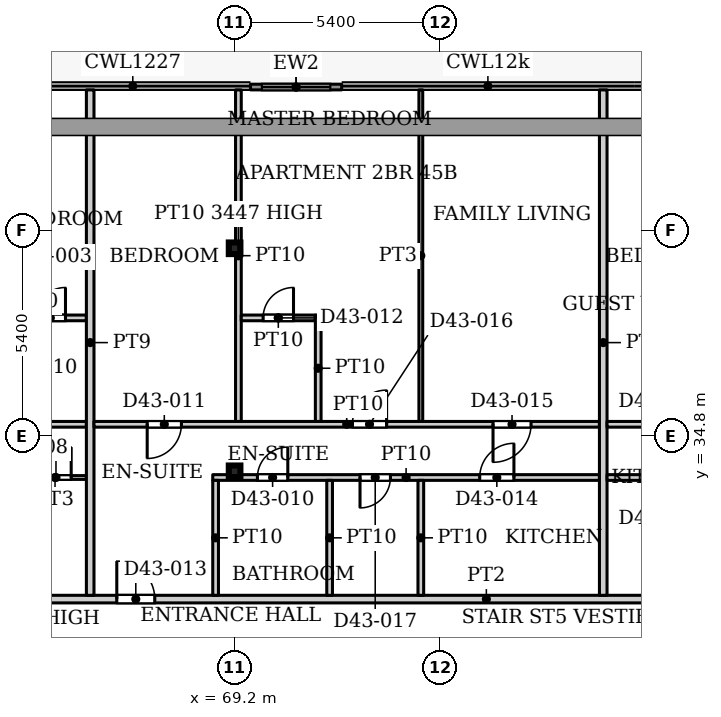
"""IFC4 building model, lengths in metres.
Left out: names, types, materials, properties, quantities, classifications, styles, units other than length and angle.
Written with IfcOpenShell. Run it as: python <this file> out.ifc"""

import sys

from ifc_helpers import new_model, si_unit, direction, frame, frame_2d, origin, origin_2d, place, context, subcontext, project, spatial, rectangle, hollow_rectangle, extrude, source, transform, mapped, element, fill, save


model = new_model("IFC4")
c1 = context("Model", 3, precision=1e-05, world=origin(), true_north=direction((0.0, 1.0)))
c2 = subcontext(c1, "Body", "Model", "MODEL_VIEW")
j1 = project(units=[si_unit("LENGTHUNIT", "METRE"), si_unit("PLANEANGLEUNIT", "RADIAN")], contexts=[c1])
p1 = place(None, origin())
s1 = spatial("IfcSite", under=j1, at=p1, CompositionType="ELEMENT")
p2 = place(p1, origin())
s2 = spatial("IfcBuilding", under=s1, at=p2, CompositionType="ELEMENT")
p3 = place(p2, frame((0.0, 0.0, 191.6)))
s3 = spatial("IfcBuildingStorey", under=s2, at=p3, CompositionType="ELEMENT", Elevation=191.6)
for number, where, z_axis, x_axis in (
    (1, (69.2, 33.863, 0.0), (0.0, 0.0, 1.0), (1.0, 0.0, 0.0)),
    (2, (69.2, 39.732, 0.0), (0.0, 0.0, 1.0), (1.0, 0.0, 0.0)),
):
    element("IfcColumn", number, at=place(p3, frame(where, z_axis=z_axis, x_axis=x_axis)), inside=s3, PredefinedType="COLUMN", context=c2, shape_type="SweptSolid", body=[
        extrude(hollow_rectangle(XDim=0.305, YDim=0.305, WallThickness=0.016, InnerFilletRadius=0.016, OuterFilletRadius=0.032, at=origin_2d()), origin(), (0.0, 0.0, 1.0), 3.9),
    ])
p4 = place(p3, frame((69.618, 43.975, 0.0), z_axis=(0.0, 0.0, 1.0), x_axis=(1.0, 0.0, 0.0)))
e3 = element("IfcWall", 3, at=p4, inside=s3, PredefinedType="SOLIDWALL", context=c2, shape_type="SweptSolid", body=[
    extrude(rectangle(XDim=2.4, YDim=0.15, at=frame_2d((1.2, 0.0))), origin(), (0.0, 0.0, 1.0), 3.75),
])
p5 = place(p4, frame((0.3, 0.0, 0.0)))
e4 = element("IfcOpeningElement", 4, at=p5, cuts=e3, PredefinedType="OPENING", context=c2, shape_type="SweptSolid", body=[
    extrude(rectangle(XDim=1.8, YDim=2.4, at=frame_2d((0.9, 1.2))), frame((0.0, 0.085, 0.0), z_axis=(0.0, -1.0, 0.0), x_axis=(1.0, 0.0, 0.0)), (0.0, 0.0, 1.0), 0.17),
])
p6 = place(p3, frame((53.549, 30.5, 0.0), z_axis=(0.0, 0.0, 1.0), x_axis=(1.0, 0.0, 0.0)))
e5 = element("IfcWall", 5, at=p6, inside=s3, PredefinedType="PARTITIONING", context=c2, shape_type="SweptSolid", body=[
    extrude(rectangle(XDim=44.551, YDim=0.2, at=frame_2d((22.275, 0.0))), origin(), (0.0, 0.0, 1.0), 3.6),
])
p7 = place(p6, frame((8.351, 0.0, 0.0)))
e6 = element("IfcOpeningElement", 6, at=p7, cuts=e5, PredefinedType="OPENING", context=c2, shape_type="SweptSolid", body=[
    extrude(rectangle(XDim=1.0, YDim=2.1, at=frame_2d((0.5, 1.05))), frame((0.0, 0.11, 0.0), z_axis=(0.0, -1.0, 0.0), x_axis=(1.0, 0.0, 0.0)), (0.0, 0.0, 1.0), 0.22),
])
p8 = place(p6, frame((12.551, 0.0, 0.0)))
e7 = element("IfcOpeningElement", 7, at=p8, cuts=e5, PredefinedType="OPENING", context=c2, shape_type="SweptSolid", body=[
    extrude(rectangle(XDim=1.0, YDim=2.1, at=frame_2d((0.5, 1.05))), frame((0.0, 0.11, 0.0), z_axis=(0.0, -1.0, 0.0), x_axis=(1.0, 0.0, 0.0)), (0.0, 0.0, 1.0), 0.22),
])
p9 = place(p6, frame((28.751, 0.0, 0.0)))
e8 = element("IfcOpeningElement", 8, at=p9, cuts=e5, PredefinedType="OPENING", context=c2, shape_type="SweptSolid", body=[
    extrude(rectangle(XDim=1.0, YDim=2.1, at=frame_2d((0.5, 1.05))), frame((0.0, 0.11, 0.0), z_axis=(0.0, -1.0, 0.0), x_axis=(1.0, 0.0, 0.0)), (0.0, 0.0, 1.0), 0.22),
])
p10 = place(p6, frame((40.751, 0.0, 0.0)))
e9 = element("IfcOpeningElement", 9, at=p10, cuts=e5, PredefinedType="OPENING", context=c2, shape_type="SweptSolid", body=[
    extrude(rectangle(XDim=1.0, YDim=2.1, at=frame_2d((0.5, 1.05))), frame((0.0, 0.11, 0.0), z_axis=(0.0, -1.0, 0.0), x_axis=(1.0, 0.0, 0.0)), (0.0, 0.0, 1.0), 0.22),
])
p11 = place(p3, frame((53.549, 35.1, 0.0), z_axis=(0.0, 0.0, 1.0), x_axis=(1.0, 0.0, 0.0)))
e10 = element("IfcWall", 10, at=p11, inside=s3, PredefinedType="PARTITIONING", context=c2, shape_type="SweptSolid", body=[
    extrude(rectangle(XDim=11.751, YDim=0.15, at=frame_2d((5.875, 0.0))), origin(), (0.0, 0.0, 1.0), 3.6),
])
p12 = place(p11, frame((5.551, 0.0, 0.0)))
e11 = element("IfcOpeningElement", 11, at=p12, cuts=e10, PredefinedType="OPENING", context=c2, shape_type="SweptSolid", body=[
    extrude(rectangle(XDim=0.9, YDim=2.1, at=frame_2d((0.45, 1.05))), frame((0.0, 0.085, 0.0), z_axis=(0.0, -1.0, 0.0), x_axis=(1.0, 0.0, 0.0)), (0.0, 0.0, 1.0), 0.17),
])
p13 = place(p11, frame((1.751, 0.0, 0.0)))
e12 = element("IfcOpeningElement", 12, at=p13, cuts=e10, PredefinedType="OPENING", context=c2, shape_type="SweptSolid", body=[
    extrude(rectangle(XDim=1.0, YDim=2.1, at=frame_2d((0.5, 1.05))), frame((0.0, 0.085, 0.0), z_axis=(0.0, -1.0, 0.0), x_axis=(1.0, 0.0, 0.0)), (0.0, 0.0, 1.0), 0.17),
])
p14 = place(p11, frame((8.101, 0.0, 0.0)))
e13 = element("IfcOpeningElement", 13, at=p14, cuts=e10, PredefinedType="OPENING", context=c2, shape_type="SweptSolid", body=[
    extrude(rectangle(XDim=0.9, YDim=2.1, at=frame_2d((0.45, 1.05))), frame((0.0, 0.085, 0.0), z_axis=(0.0, -1.0, 0.0), x_axis=(1.0, 0.0, 0.0)), (0.0, 0.0, 1.0), 0.17),
])
p15 = place(p3, frame((63.375, 37.9, 0.0), z_axis=(0.0, 0.0, 1.0), x_axis=(1.0, 0.0, 0.0)))
e14 = element("IfcWall", 14, at=p15, inside=s3, PredefinedType="PARTITIONING", context=c2, shape_type="SweptSolid", body=[
    extrude(rectangle(XDim=1.925, YDim=0.15, at=frame_2d((0.962, 0.0))), origin(), (0.0, 0.0, 1.0), 3.6),
])
p16 = place(p15, frame((0.575, 0.0, 0.0)))
e15 = element("IfcOpeningElement", 15, at=p16, cuts=e14, PredefinedType="OPENING", context=c2, shape_type="SweptSolid", body=[
    extrude(rectangle(XDim=0.8, YDim=2.1, at=frame_2d((0.4, 1.05))), frame((0.0, 0.085, 0.0), z_axis=(0.0, -1.0, 0.0), x_axis=(1.0, 0.0, 0.0)), (0.0, 0.0, 1.0), 0.17),
])
p17 = place(p3, frame((63.65, 33.7, 0.0), z_axis=(0.0, 0.0, 1.0), x_axis=(1.0, 0.0, 0.0)))
e16 = element("IfcWall", 16, at=p17, inside=s3, PredefinedType="PARTITIONING", context=c2, shape_type="SweptSolid", body=[
    extrude(rectangle(XDim=1.65, YDim=0.1, at=frame_2d((0.825, 0.0))), origin(), (0.0, 0.0, 1.0), 3.6),
])
p18 = place(p17, frame((0.45, 0.0, 0.0)))
e17 = element("IfcOpeningElement", 17, at=p18, cuts=e16, PredefinedType="OPENING", context=c2, shape_type="SweptSolid", body=[
    extrude(rectangle(XDim=0.8, YDim=2.1, at=frame_2d((0.4, 1.05))), frame((0.0, 0.06, 0.0), z_axis=(0.0, -1.0, 0.0), x_axis=(1.0, 0.0, 0.0)), (0.0, 0.0, 1.0), 0.12),
])
p19 = place(p3, frame((65.4, 30.6, 0.0), z_axis=(0.0, 0.0, 1.0), x_axis=(0.0, 1.0, 0.0)))
e18 = element("IfcWall", 18, at=p19, inside=s3, PredefinedType="PARTITIONING", context=c2, shape_type="SweptSolid", body=[
    extrude(rectangle(XDim=13.3, YDim=0.2, at=frame_2d((6.65, 0.0))), origin(), (0.0, 0.0, 1.0), 3.6),
])
p20 = place(p3, frame((65.5, 35.1, 0.0), z_axis=(0.0, 0.0, 1.0), x_axis=(1.0, 0.0, 0.0)))
e19 = element("IfcWall", 19, at=p20, inside=s3, PredefinedType="PARTITIONING", context=c2, shape_type="SweptSolid", body=[
    extrude(rectangle(XDim=13.3, YDim=0.15, at=frame_2d((6.65, 0.0))), origin(), (0.0, 0.0, 1.0), 3.6),
])
p21 = place(p20, frame((1.4, 0.0, 0.0)))
e20 = element("IfcOpeningElement", 20, at=p21, cuts=e19, PredefinedType="OPENING", context=c2, shape_type="SweptSolid", body=[
    extrude(rectangle(XDim=0.9, YDim=2.1, at=frame_2d((0.45, 1.05))), frame((0.0, 0.085, 0.0), z_axis=(0.0, -1.0, 0.0), x_axis=(1.0, 0.0, 0.0)), (0.0, 0.0, 1.0), 0.17),
])
p22 = place(p20, frame((10.5, 0.0, 0.0)))
e21 = element("IfcOpeningElement", 21, at=p22, cuts=e19, PredefinedType="OPENING", context=c2, shape_type="SweptSolid", body=[
    extrude(rectangle(XDim=1.0, YDim=2.1, at=frame_2d((0.5, 1.05))), frame((0.0, 0.085, 0.0), z_axis=(0.0, -1.0, 0.0), x_axis=(1.0, 0.0, 0.0)), (0.0, 0.0, 1.0), 0.17),
])
p23 = place(p20, frame((6.8, 0.0, 0.0)))
e22 = element("IfcOpeningElement", 22, at=p23, cuts=e19, PredefinedType="OPENING", context=c2, shape_type="SweptSolid", body=[
    extrude(rectangle(XDim=0.9, YDim=2.1, at=frame_2d((0.45, 1.05))), frame((0.0, 0.085, 0.0), z_axis=(0.0, -1.0, 0.0), x_axis=(1.0, 0.0, 0.0)), (0.0, 0.0, 1.0), 0.17),
])
p24 = place(p3, frame((68.625, 33.7, 0.0), z_axis=(0.0, 0.0, 1.0), x_axis=(1.0, 0.0, 0.0)))
e23 = element("IfcWall", 23, at=p24, inside=s3, PredefinedType="PARTITIONING", context=c2, shape_type="SweptSolid", body=[
    extrude(rectangle(XDim=10.175, YDim=0.15, at=frame_2d((5.087, 0.0))), origin(), (0.0, 0.0, 1.0), 3.6),
])
p25 = place(p24, frame((1.175, 0.0, 0.0)))
e24 = element("IfcOpeningElement", 24, at=p25, cuts=e23, PredefinedType="OPENING", context=c2, shape_type="SweptSolid", body=[
    extrude(rectangle(XDim=0.8, YDim=2.1, at=frame_2d((0.4, 1.05))), frame((0.0, 0.085, 0.0), z_axis=(0.0, -1.0, 0.0), x_axis=(1.0, 0.0, 0.0)), (0.0, 0.0, 1.0), 0.17),
])
p26 = place(p24, frame((7.025, 0.0, 0.0)))
e25 = element("IfcOpeningElement", 25, at=p26, cuts=e23, PredefinedType="OPENING", context=c2, shape_type="SweptSolid", body=[
    extrude(rectangle(XDim=0.9, YDim=2.1, at=frame_2d((0.45, 1.05))), frame((0.0, 0.085, 0.0), z_axis=(0.0, -1.0, 0.0), x_axis=(1.0, 0.0, 0.0)), (0.0, 0.0, 1.0), 0.17),
])
p27 = place(p24, frame((3.875, 0.0, 0.0)))
e26 = element("IfcOpeningElement", 26, at=p27, cuts=e23, PredefinedType="OPENING", context=c2, shape_type="SweptSolid", body=[
    extrude(rectangle(XDim=0.8, YDim=2.1, at=frame_2d((0.4, 1.05))), frame((0.0, 0.085, 0.0), z_axis=(0.0, -1.0, 0.0), x_axis=(1.0, 0.0, 0.0)), (0.0, 0.0, 1.0), 0.17),
])
p28 = place(p3, frame((68.7, 30.6, 0.0), z_axis=(0.0, 0.0, 1.0), x_axis=(0.0, 1.0, 0.0)))
e27 = element("IfcWall", 27, at=p28, inside=s3, PredefinedType="PARTITIONING", context=c2, shape_type="SweptSolid", body=[
    extrude(rectangle(XDim=3.025, YDim=0.15, at=frame_2d((1.512, 0.0))), origin(), (0.0, 0.0, 1.0), 3.6),
])
p29 = place(p3, frame((69.3, 35.175, 0.0), z_axis=(0.0, 0.0, 1.0), x_axis=(0.0, 1.0, 0.0)))
e28 = element("IfcWall", 28, at=p29, inside=s3, PredefinedType="PARTITIONING", context=c2, shape_type="SweptSolid", body=[
    extrude(rectangle(XDim=8.725, YDim=0.15, at=frame_2d((4.362, 0.0))), origin(), (0.0, 0.0, 1.0), 3.447),
])
p30 = place(p3, frame((69.375, 37.9, 0.0), z_axis=(0.0, 0.0, 1.0), x_axis=(1.0, 0.0, 0.0)))
e29 = element("IfcWall", 29, at=p30, inside=s3, PredefinedType="PARTITIONING", context=c2, shape_type="SweptSolid", body=[
    extrude(rectangle(XDim=1.95, YDim=0.15, at=frame_2d((0.975, 0.0))), origin(), (0.0, 0.0, 1.0), 3.6),
])
p31 = place(p30, frame((0.575, 0.0, 0.0)))
e30 = element("IfcOpeningElement", 30, at=p31, cuts=e29, PredefinedType="OPENING", context=c2, shape_type="SweptSolid", body=[
    extrude(rectangle(XDim=0.8, YDim=2.1, at=frame_2d((0.4, 1.05))), frame((0.0, 0.085, 0.0), z_axis=(0.0, -1.0, 0.0), x_axis=(1.0, 0.0, 0.0)), (0.0, 0.0, 1.0), 0.17),
])
p32 = place(p3, frame((71.4, 35.175, 0.0), z_axis=(0.0, 0.0, 1.0), x_axis=(0.0, 1.0, 0.0)))
e31 = element("IfcWall", 31, at=p32, inside=s3, PredefinedType="PARTITIONING", context=c2, shape_type="SweptSolid", body=[
    extrude(rectangle(XDim=2.8, YDim=0.15, at=frame_2d((1.4, 0.0))), origin(), (0.0, 0.0, 1.0), 3.6),
])
for number, where, z_axis, x_axis in (
    (32, (71.7, 30.6, 0.0), (0.0, 0.0, 1.0), (0.0, 1.0, 0.0)),
    (33, (74.1, 30.6, 0.0), (0.0, 0.0, 1.0), (0.0, 1.0, 0.0)),
):
    element("IfcWall", number, at=place(p3, frame(where, z_axis=z_axis, x_axis=x_axis)), inside=s3, PredefinedType="PARTITIONING", context=c2, shape_type="SweptSolid", body=[
        extrude(rectangle(XDim=3.025, YDim=0.15, at=frame_2d((1.512, 0.0))), origin(), (0.0, 0.0, 1.0), 3.6),
    ])
p33 = place(p3, frame((74.1, 35.175, 0.0), z_axis=(0.0, 0.0, 1.0), x_axis=(0.0, 1.0, 0.0)))
e34 = element("IfcWall", 34, at=p33, inside=s3, PredefinedType="PARTITIONING", context=c2, shape_type="SweptSolid", body=[
    extrude(rectangle(XDim=8.725, YDim=0.1, at=frame_2d((4.362, 0.0))), origin(), (0.0, 0.0, 1.0), 3.6),
])
p34 = place(p3, frame((78.9, 30.6, 0.0), z_axis=(0.0, 0.0, 1.0), x_axis=(0.0, 1.0, 0.0)))
e35 = element("IfcWall", 35, at=p34, inside=s3, PredefinedType="PARTITIONING", context=c2, shape_type="SweptSolid", body=[
    extrude(rectangle(XDim=13.3, YDim=0.2, at=frame_2d((6.65, 0.0))), origin(), (0.0, 0.0, 1.0), 3.6),
])
p35 = place(p3, frame((79.0, 33.7, 0.0), z_axis=(0.0, 0.0, 1.0), x_axis=(1.0, 0.0, 0.0)))
e36 = element("IfcWall", 36, at=p35, inside=s3, PredefinedType="PARTITIONING", context=c2, shape_type="SweptSolid", body=[
    extrude(rectangle(XDim=2.95, YDim=0.15, at=frame_2d((1.475, 0.0))), origin(), (0.0, 0.0, 1.0), 3.6),
])
p36 = place(p35, frame((0.95, 0.0, 0.0)))
e37 = element("IfcOpeningElement", 37, at=p36, cuts=e36, PredefinedType="OPENING", context=c2, shape_type="SweptSolid", body=[
    extrude(rectangle(XDim=0.9, YDim=2.1, at=frame_2d((0.45, 1.05))), frame((0.0, 0.085, 0.0), z_axis=(0.0, -1.0, 0.0), x_axis=(1.0, 0.0, 0.0)), (0.0, 0.0, 1.0), 0.17),
])
p37 = place(p3, frame((79.0, 35.1, 0.0), z_axis=(0.0, 0.0, 1.0), x_axis=(1.0, 0.0, 0.0)))
e38 = element("IfcWall", 38, at=p37, inside=s3, PredefinedType="PARTITIONING", context=c2, shape_type="SweptSolid", body=[
    extrude(rectangle(XDim=11.5, YDim=0.15, at=frame_2d((5.75, 0.0))), origin(), (0.0, 0.0, 1.0), 3.6),
])
p38 = place(p37, frame((0.95, 0.0, 0.0)))
e39 = element("IfcOpeningElement", 39, at=p38, cuts=e38, PredefinedType="OPENING", context=c2, shape_type="SweptSolid", body=[
    extrude(rectangle(XDim=0.9, YDim=2.1, at=frame_2d((0.45, 1.05))), frame((0.0, 0.085, 0.0), z_axis=(0.0, -1.0, 0.0), x_axis=(1.0, 0.0, 0.0)), (0.0, 0.0, 1.0), 0.17),
])
p39 = place(p37, frame((4.35, 0.0, 0.0)))
e40 = element("IfcOpeningElement", 40, at=p39, cuts=e38, PredefinedType="OPENING", context=c2, shape_type="SweptSolid", body=[
    extrude(rectangle(XDim=1.0, YDim=2.1, at=frame_2d((0.5, 1.05))), frame((0.0, 0.085, 0.0), z_axis=(0.0, -1.0, 0.0), x_axis=(1.0, 0.0, 0.0)), (0.0, 0.0, 1.0), 0.17),
])
p40 = place(p37, frame((9.8, 0.0, 0.0)))
e41 = element("IfcOpeningElement", 41, at=p40, cuts=e38, PredefinedType="OPENING", context=c2, shape_type="SweptSolid", body=[
    extrude(rectangle(XDim=0.9, YDim=2.1, at=frame_2d((0.45, 1.05))), frame((0.0, 0.085, 0.0), z_axis=(0.0, -1.0, 0.0), x_axis=(1.0, 0.0, 0.0)), (0.0, 0.0, 1.0), 0.17),
])
m1 = source(origin(), c2, "Body", "SweptSolid", [
    extrude(rectangle(XDim=1.8, YDim=2.4, at=frame_2d((0.9, 1.2))), frame((0.0, 0.025, 0.0), z_axis=(0.0, -1.0, 0.0), x_axis=(1.0, 0.0, 0.0)), (0.0, 0.0, 1.0), 0.05),
])
p41 = place(p5, origin())
e42 = element("IfcDoor", 42, at=p41, inside=s3, OperationType="SLIDING_TO_LEFT", PredefinedType="DOOR", context=c2, shape_type="MappedRepresentation", body=[
    mapped(m1, transform((0.0, 0.0, 0.0), x_axis=(1.0, 0.0, 0.0), y_axis=(0.0, 1.0, 0.0), z_axis=(0.0, 0.0, 1.0), scale=1.0)),
])
fill(e4, e42)
m2 = source(origin(), c2, "Body", "SweptSolid", [
    extrude(rectangle(XDim=0.8, YDim=2.1, at=frame_2d((0.4, 1.05))), frame((0.0, 0.025, 0.0), z_axis=(0.0, -1.0, 0.0), x_axis=(1.0, 0.0, 0.0)), (0.0, 0.0, 1.0), 0.05),
])
p42 = place(p16, origin())
e43 = element("IfcDoor", 43, at=p42, inside=s3, OperationType="SINGLE_SWING_LEFT", PredefinedType="DOOR", context=c2, shape_type="MappedRepresentation", body=[
    mapped(m2, transform((0.0, 0.0, 0.0), x_axis=(1.0, 0.0, 0.0), y_axis=(0.0, 1.0, 0.0), z_axis=(0.0, 0.0, 1.0), scale=1.0)),
])
fill(e15, e43)
p43 = place(p18, origin())
e44 = element("IfcDoor", 44, at=p43, inside=s3, OperationType="SINGLE_SWING_LEFT", PredefinedType="DOOR", context=c2, shape_type="MappedRepresentation", body=[
    mapped(m2, transform((0.0, 0.0, 0.0), x_axis=(1.0, 0.0, 0.0), y_axis=(0.0, 1.0, 0.0), z_axis=(0.0, 0.0, 1.0), scale=1.0)),
])
fill(e17, e44)
p44 = place(p25, origin())
e45 = element("IfcDoor", 45, at=p44, inside=s3, OperationType="SINGLE_SWING_LEFT", PredefinedType="DOOR", context=c2, shape_type="MappedRepresentation", body=[
    mapped(m2, transform((0.0, 0.0, 0.0), x_axis=(1.0, 0.0, 0.0), y_axis=(0.0, 1.0, 0.0), z_axis=(0.0, 0.0, 1.0), scale=1.0)),
])
fill(e24, e45)
m3 = source(origin(), c2, "Body", "SweptSolid", [
    extrude(rectangle(XDim=0.9, YDim=2.1, at=frame_2d((0.45, 1.05))), frame((0.0, 0.025, 0.0), z_axis=(0.0, -1.0, 0.0), x_axis=(1.0, 0.0, 0.0)), (0.0, 0.0, 1.0), 0.05),
])
p45 = place(p21, origin())
e46 = element("IfcDoor", 46, at=p45, inside=s3, OperationType="SINGLE_SWING_RIGHT", PredefinedType="DOOR", context=c2, shape_type="MappedRepresentation", body=[
    mapped(m3, transform((0.0, 0.0, 0.0), x_axis=(1.0, 0.0, 0.0), y_axis=(0.0, 1.0, 0.0), z_axis=(0.0, 0.0, 1.0), scale=1.0)),
])
fill(e20, e46)
p46 = place(p31, origin())
e47 = element("IfcDoor", 47, at=p46, inside=s3, OperationType="SINGLE_SWING_LEFT", PredefinedType="DOOR", context=c2, shape_type="MappedRepresentation", body=[
    mapped(m2, transform((0.0, 0.0, 0.0), x_axis=(1.0, 0.0, 0.0), y_axis=(0.0, 1.0, 0.0), z_axis=(0.0, 0.0, 1.0), scale=1.0)),
])
fill(e30, e47)
m4 = source(origin(), c2, "Body", "SweptSolid", [
    extrude(rectangle(XDim=1.0, YDim=2.1, at=frame_2d((0.5, 1.05))), frame((0.0, 0.025, 0.0), z_axis=(0.0, -1.0, 0.0), x_axis=(1.0, 0.0, 0.0)), (0.0, 0.0, 1.0), 0.05),
])
p47 = place(p8, origin())
e48 = element("IfcDoor", 48, at=p47, inside=s3, OperationType="SINGLE_SWING_LEFT", PredefinedType="DOOR", context=c2, shape_type="MappedRepresentation", body=[
    mapped(m4, transform((0.0, 0.0, 0.0), x_axis=(1.0, 0.0, 0.0), y_axis=(0.0, 1.0, 0.0), z_axis=(0.0, 0.0, 1.0), scale=1.0)),
])
fill(e7, e48)
p48 = place(p26, origin())
e49 = element("IfcDoor", 49, at=p48, inside=s3, OperationType="SINGLE_SWING_LEFT", PredefinedType="DOOR", context=c2, shape_type="MappedRepresentation", body=[
    mapped(m3, transform((0.0, 0.0, 0.0), x_axis=(1.0, 0.0, 0.0), y_axis=(0.0, 1.0, 0.0), z_axis=(0.0, 0.0, 1.0), scale=1.0)),
])
fill(e25, e49)
m5 = source(origin(), c2, "Body", "SweptSolid", [
    extrude(rectangle(XDim=1.0, YDim=2.1, at=frame_2d((0.5, 1.05))), frame((0.0, 0.025, 0.0), z_axis=(0.0, -1.0, 0.0), x_axis=(1.0, 0.0, 0.0)), (0.0, 0.0, 1.0), 0.05),
])
p49 = place(p22, origin())
e50 = element("IfcDoor", 50, at=p49, inside=s3, OperationType="SINGLE_SWING_RIGHT", PredefinedType="DOOR", context=c2, shape_type="MappedRepresentation", body=[
    mapped(m5, transform((0.0, 0.0, 0.0), x_axis=(1.0, 0.0, 0.0), y_axis=(0.0, 1.0, 0.0), z_axis=(0.0, 0.0, 1.0), scale=1.0)),
])
fill(e21, e50)
p50 = place(p23, origin())
e51 = element("IfcDoor", 51, at=p50, inside=s3, OperationType="SINGLE_SWING_LEFT", PredefinedType="DOOR", context=c2, shape_type="MappedRepresentation", body=[
    mapped(m3, transform((0.0, 0.0, 0.0), x_axis=(1.0, 0.0, 0.0), y_axis=(0.0, 1.0, 0.0), z_axis=(0.0, 0.0, 1.0), scale=1.0)),
])
fill(e22, e51)
p51 = place(p27, origin())
e52 = element("IfcDoor", 52, at=p51, inside=s3, OperationType="SINGLE_SWING_RIGHT", PredefinedType="DOOR", context=c2, shape_type="MappedRepresentation", body=[
    mapped(m2, transform((0.0, 0.0, 0.0), x_axis=(1.0, 0.0, 0.0), y_axis=(0.0, 1.0, 0.0), z_axis=(0.0, 0.0, 1.0), scale=1.0)),
])
fill(e26, e52)
save(model, sys.argv[1])
